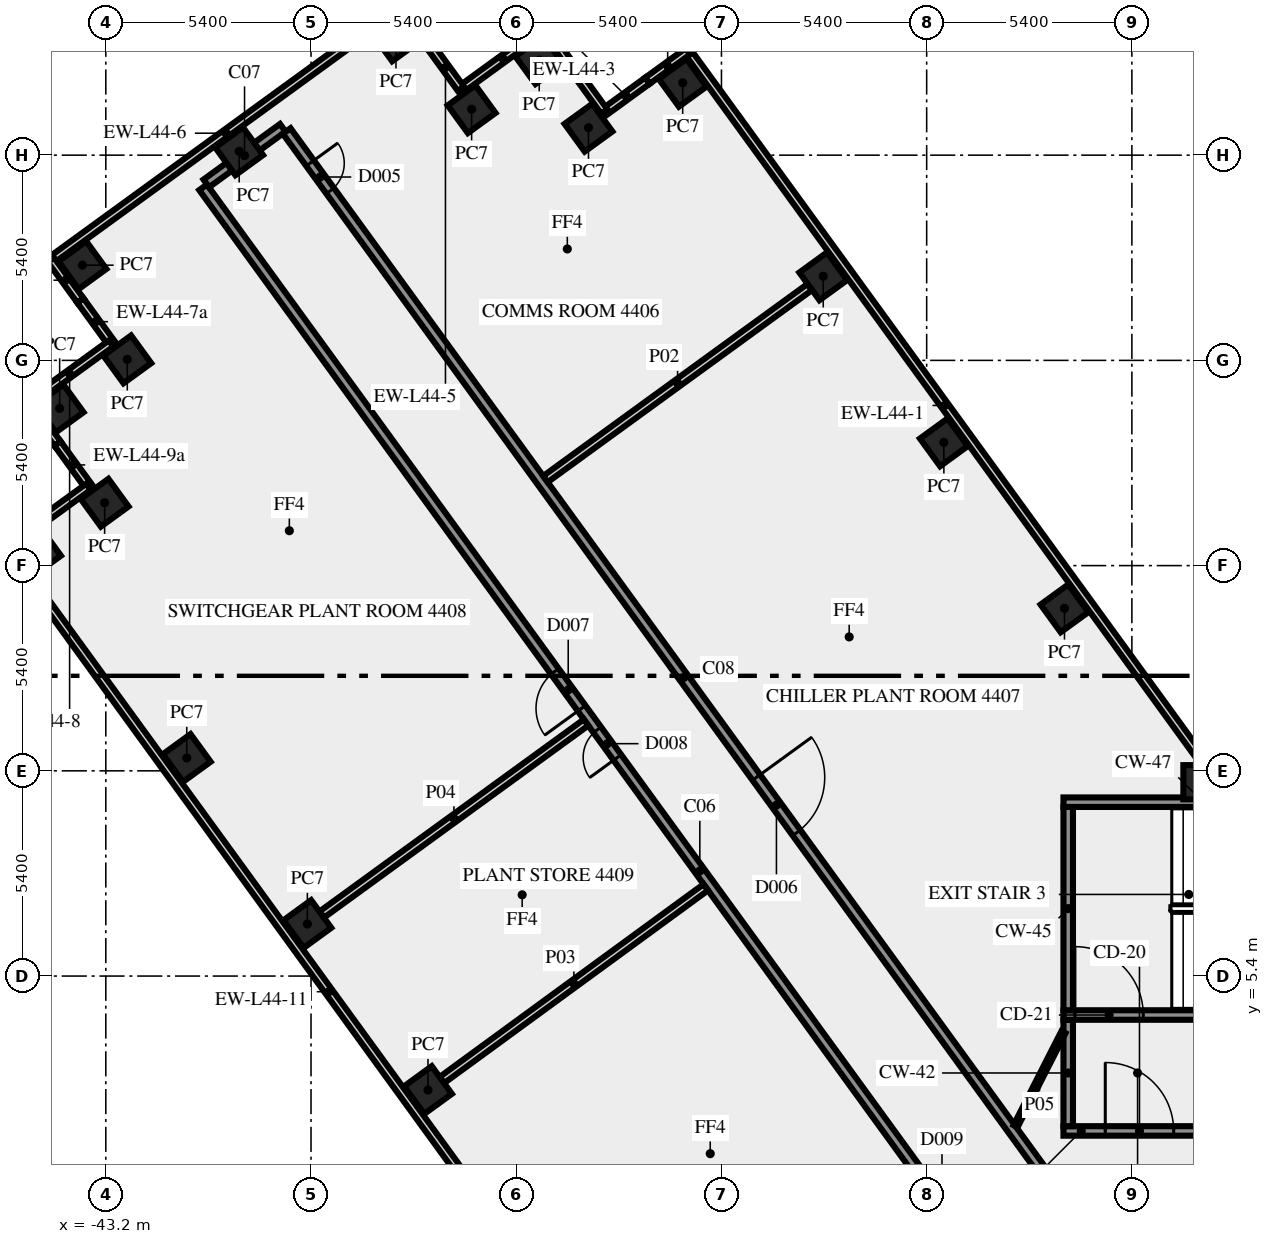
"""IFC4 building model, lengths in metres.
Left out: names, types, materials, properties, quantities, classifications, styles, units other than length and angle.
Written with IfcOpenShell. Run it as: python <this file> out.ifc"""

import sys

from ifc_helpers import new_model, si_unit, direction, frame, frame_2d, origin, origin_2d, place, context, subcontext, project, spatial, rectangle, extrude, element, fill, save


model = new_model("IFC4")
c1 = context("Model", 3, precision=1e-05, world=origin(), true_north=direction((0.0, 1.0)))
c2 = subcontext(c1, "Body", "Model", "MODEL_VIEW")
j1 = project(units=[si_unit("LENGTHUNIT", "METRE"), si_unit("PLANEANGLEUNIT", "RADIAN")], contexts=[c1])
p1 = place(None, origin())
s1 = spatial("IfcSite", under=j1, at=p1, CompositionType="ELEMENT")
p2 = place(p1, origin())
s2 = spatial("IfcBuilding", under=s1, at=p2, CompositionType="ELEMENT")
p3 = place(p2, frame((0.0, 0.0, 188.0)))
s3 = spatial("IfcBuildingStorey", under=s2, at=p3, CompositionType="ELEMENT", Elevation=188.0)
for number, where, z_axis, x_axis in (
    (1, (-17.974, 15.075, 0.0), (0.0, 0.0, 1.0), (-0.588, 0.809, 0.0)),
    (2, (-21.147, 19.444, 0.0), (0.0, 0.0, 1.0), (-0.588, 0.809, 0.0)),
    (3, (-24.321, 23.812, 0.0), (0.0, 0.0, 1.0), (-0.588, 0.809, 0.0)),
    (4, (-28.02, 28.905, 0.0), (0.0, 0.0, 1.0), (-0.809, -0.588, 0.0)),
    (5, (-30.499, 27.723, 0.0), (0.0, 0.0, 1.0), (-0.809, -0.588, 0.0)),
    (6, (-31.795, 29.5, 0.0), (0.0, 0.0, 1.0), (-0.588, 0.809, 0.0)),
    (7, (-33.574, 28.209, 0.0), (0.0, 0.0, 1.0), (-0.588, 0.809, 0.0)),
    (8, (-35.565, 30.1, 0.0), (0.0, 0.0, 1.0), (-0.809, -0.588, 0.0)),
    (9, (-39.691, 27.102, 0.0), (0.0, 0.0, 1.0), (-0.809, -0.588, 0.0)),
    (10, (-43.815, 24.105, 0.0), (0.0, 0.0, 1.0), (-0.809, -0.588, 0.0)),
    (11, (-42.635, 21.626, 0.0), (0.0, 0.0, 1.0), (-0.809, -0.588, 0.0)),
    (12, (-44.415, 20.335, 0.0), (0.0, 0.0, 1.0), (0.588, -0.809, 0.0)),
    (13, (-43.231, 17.854, 0.0), (0.0, 0.0, 1.0), (0.588, -0.809, 0.0)),
    (14, (-45.01, 16.56, 0.0), (0.0, 0.0, 1.0), (0.588, -0.809, 0.0)),
    (15, (-41.07, 11.137, 0.0), (0.0, 0.0, 1.0), (0.588, -0.809, 0.0)),
    (16, (-37.896, 6.769, 0.0), (0.0, 0.0, 1.0), (0.588, -0.809, 0.0)),
    (17, (-34.722, 2.4, 0.0), (0.0, 0.0, 1.0), (0.588, -0.809, 0.0)),
    (18, (-14.395, 10.5, 0.0), (0.0, 0.0, 1.0), (-1.0, 0.0, 0.0)),
):
    element("IfcColumn", number, at=place(p3, frame(where, z_axis=z_axis, x_axis=x_axis)), inside=s3, PredefinedType="COLUMN", context=c2, shape_type="SweptSolid", body=[
        extrude(rectangle(XDim=0.9, YDim=0.9, at=origin_2d()), origin(), (0.0, 0.0, 1.0), 5.65),
    ])
p4 = place(p3, frame((-14.354, 11.093, 0.0), z_axis=(0.0, 0.0, 1.0), x_axis=(-0.587790518608, 0.809013168147, 0.0)))
e19 = element("IfcWall", 19, at=p4, inside=s3, PredefinedType="SOLIDWALL", context=c2, shape_type="SweptSolid", body=[
    extrude(rectangle(XDim=23.044, YDim=0.2, at=frame_2d((11.522, 0.0))), origin(), (0.0, 0.0, 1.0), 5.65),
])
p5 = place(p3, frame((-27.882, 29.733, 0.0), z_axis=(0.0, 0.0, 1.0), x_axis=(-0.809064357795, -0.587720056613, 0.0)))
e20 = element("IfcWall", 20, at=p5, inside=s3, PredefinedType="SOLIDWALL", context=c2, shape_type="SweptSolid", body=[
    extrude(rectangle(XDim=1.318, YDim=0.2, at=frame_2d((0.659, 0.0))), origin(), (0.0, 0.0, 1.0), 5.65),
])
p6 = place(p3, frame((-28.949, 28.959, 0.0), z_axis=(0.0, 0.0, 1.0), x_axis=(-0.809003403559, -0.587803957991, 0.0)))
e21 = element("IfcWall", 21, at=p6, inside=s3, PredefinedType="SOLIDWALL", context=c2, shape_type="SweptSolid", body=[
    extrude(rectangle(XDim=1.382, YDim=0.2, at=frame_2d((0.691, 0.0))), origin(), (0.0, 0.0, 1.0), 4.15),
])
for number, where, z_axis, x_axis in (
    (22, (-30.083, 28.149, 0.0), (0.0, 0.0, 1.0), (-0.588, 0.809, 0.0)),
    (23, (-31.654, 30.331, 0.0), (0.0, 0.0, 1.0), (-0.809, -0.588, 0.0)),
):
    element("IfcWall", number, at=place(p3, frame(where, z_axis=z_axis, x_axis=x_axis)), inside=s3, PredefinedType="SOLIDWALL", context=c2, shape_type="SweptSolid", body=[
        extrude(rectangle(XDim=2.7, YDim=0.2, at=frame_2d((1.35, 0.0))), origin(), (0.0, 0.0, 1.0), 5.65),
    ])
p7 = place(p3, frame((-33.855, 28.746, 0.0), z_axis=(0.0, 0.0, 1.0), x_axis=(-0.587847138415, 0.808972027858, 0.0)))
e24 = element("IfcWall", 24, at=p7, inside=s3, PredefinedType="SOLIDWALL", context=c2, shape_type="SweptSolid", body=[
    extrude(rectangle(XDim=1.387, YDim=0.2, at=frame_2d((0.693, 0.0))), origin(), (0.0, 0.0, 1.0), 4.15),
])
p8 = place(p3, frame((-35.425, 30.928, 0.0), z_axis=(0.0, 0.0, 1.0), x_axis=(-0.809005491952, -0.587801083694, 0.0)))
e25 = element("IfcWall", 25, at=p8, inside=s3, PredefinedType="SOLIDWALL", context=c2, shape_type="SweptSolid", body=[
    extrude(rectangle(XDim=11.4, YDim=0.2, at=frame_2d((5.7, 0.0))), origin(), (0.0, 0.0, 1.0), 5.65),
])
p9 = place(p3, frame((-44.645, 24.244, 0.0), z_axis=(0.0, 0.0, 1.0), x_axis=(0.587797718958, -0.809007936665, 0.0)))
e26 = element("IfcWall", 26, at=p9, inside=s3, PredefinedType="SOLIDWALL", context=c2, shape_type="SweptSolid", body=[
    extrude(rectangle(XDim=1.32, YDim=0.2, at=frame_2d((0.66, 0.0))), origin(), (0.0, 0.0, 1.0), 5.65),
])
p10 = place(p3, frame((-43.869, 23.176, 0.0), z_axis=(0.0, 0.0, 1.0), x_axis=(0.587845576324, -0.808973162964, 0.0)))
e27 = element("IfcWall", 27, at=p10, inside=s3, PredefinedType="SOLIDWALL", context=c2, shape_type="SweptSolid", body=[
    extrude(rectangle(XDim=1.38, YDim=0.2, at=frame_2d((0.69, 0.0))), origin(), (0.0, 0.0, 1.0), 4.15),
])
p11 = place(p3, frame((-43.061, 22.043, 0.0), z_axis=(0.0, 0.0, 1.0), x_axis=(-0.809033161865, -0.587762999008, 0.0)))
e28 = element("IfcWall", 28, at=p11, inside=s3, PredefinedType="SOLIDWALL", context=c2, shape_type="SweptSolid", body=[
    extrude(rectangle(XDim=2.7, YDim=0.2, at=frame_2d((1.35, 0.0))), origin(), (0.0, 0.0, 1.0), 5.65),
])
p12 = place(p3, frame((-45.242, 20.473, 0.0), z_axis=(0.0, 0.0, 1.0), x_axis=(0.587652369972, -0.809113522361, 0.0)))
e29 = element("IfcWall", 29, at=p12, inside=s3, PredefinedType="SOLIDWALL", context=c2, shape_type="SweptSolid", body=[
    extrude(rectangle(XDim=1.314, YDim=0.2, at=frame_2d((0.657, 0.0))), origin(), (0.0, 0.0, 1.0), 5.65),
])
p13 = place(p3, frame((-44.47, 19.41, 0.0), z_axis=(0.0, 0.0, 1.0), x_axis=(0.58786788786, -0.808956949672, 0.0)))
e30 = element("IfcWall", 30, at=p13, inside=s3, PredefinedType="SOLIDWALL", context=c2, shape_type="SweptSolid", body=[
    extrude(rectangle(XDim=1.386, YDim=0.2, at=frame_2d((0.693, 0.0))), origin(), (0.0, 0.0, 1.0), 4.15),
])
p14 = place(p3, frame((-43.658, 18.272, 0.0), z_axis=(0.0, 0.0, 1.0), x_axis=(-0.808958916286, -0.58786518162, 0.0)))
e31 = element("IfcWall", 31, at=p14, inside=s3, PredefinedType="SOLIDWALL", context=c2, shape_type="SweptSolid", body=[
    extrude(rectangle(XDim=2.7, YDim=0.2, at=frame_2d((1.35, 0.0))), origin(), (0.0, 0.0, 1.0), 5.65),
])
p15 = place(p3, frame((-45.84, 16.701, 0.0), z_axis=(0.0, 0.0, 1.0), x_axis=(0.587788110303, -0.809014917901, 0.0)))
e32 = element("IfcWall", 32, at=p15, inside=s3, PredefinedType="SOLIDWALL", context=c2, shape_type="SweptSolid", body=[
    extrude(rectangle(XDim=28.956, YDim=0.2, at=frame_2d((14.478, 0.0))), origin(), (0.0, 0.0, 1.0), 5.65),
])
p16 = place(p3, frame((-18.0, 1.325, 0.0), z_axis=(0.0, 0.0, 1.0), x_axis=(1.0, 0.0, 0.0)))
e33 = element("IfcWall", 33, at=p16, inside=s3, PredefinedType="SHEAR", context=c2, shape_type="SweptSolid", body=[
    extrude(rectangle(XDim=3.9, YDim=0.25, at=frame_2d((1.95, 0.0))), origin(), (0.0, 0.0, 1.0), 5.65),
])
p17 = place(p16, frame((1.1, 0.0, 0.0)))
e34 = element("IfcOpeningElement", 34, at=p17, cuts=e33, PredefinedType="OPENING", context=c2, shape_type="SweptSolid", body=[
    extrude(rectangle(XDim=1.8, YDim=2.1, at=frame_2d((0.9, 1.05))), frame((0.0, 0.135, 0.0), z_axis=(0.0, -1.0, 0.0), x_axis=(1.0, 0.0, 0.0)), (0.0, 0.0, 1.0), 0.27),
])
p18 = place(p3, frame((-17.875, 1.45, 0.0), z_axis=(0.0, 0.0, 1.0), x_axis=(0.0, 1.0, 0.0)))
e35 = element("IfcWall", 35, at=p18, inside=s3, PredefinedType="SHEAR", context=c2, shape_type="SweptSolid", body=[
    extrude(rectangle(XDim=2.8, YDim=0.25, at=frame_2d((1.4, 0.0))), origin(), (0.0, 0.0, 1.0), 5.65),
])
p19 = place(p3, frame((-18.0, 4.375, 0.0), z_axis=(0.0, 0.0, 1.0), x_axis=(1.0, 0.0, 0.0)))
e36 = element("IfcWall", 36, at=p19, inside=s3, PredefinedType="SHEAR", context=c2, shape_type="SweptSolid", body=[
    extrude(rectangle(XDim=10.5, YDim=0.25, at=frame_2d((5.25, 0.0))), origin(), (0.0, 0.0, 1.0), 5.65),
])
p20 = place(p19, frame((0.3, 0.0, 0.0)))
e37 = element("IfcOpeningElement", 37, at=p20, cuts=e36, PredefinedType="OPENING", context=c2, shape_type="SweptSolid", body=[
    extrude(rectangle(XDim=1.8, YDim=2.1, at=frame_2d((0.9, 1.05))), frame((0.0, 0.135, 0.0), z_axis=(0.0, -1.0, 0.0), x_axis=(1.0, 0.0, 0.0)), (0.0, 0.0, 1.0), 0.27),
])
p21 = place(p3, frame((-17.875, 4.5, 0.0), z_axis=(0.0, 0.0, 1.0), x_axis=(0.0, 1.0, 0.0)))
e38 = element("IfcWall", 38, at=p21, inside=s3, PredefinedType="SHEAR", context=c2, shape_type="SweptSolid", body=[
    extrude(rectangle(XDim=5.35, YDim=0.25, at=frame_2d((2.675, 0.0))), origin(), (0.0, 0.0, 1.0), 5.65),
])
p22 = place(p3, frame((-18.0, 9.975, 0.0), z_axis=(0.0, 0.0, 1.0), x_axis=(1.0, 0.0, 0.0)))
e39 = element("IfcWall", 39, at=p22, inside=s3, PredefinedType="SHEAR", context=c2, shape_type="SweptSolid", body=[
    extrude(rectangle(XDim=10.5, YDim=0.25, at=frame_2d((5.25, 0.0))), origin(), (0.0, 0.0, 1.0), 5.65),
])
p23 = place(p22, frame((4.5, 0.0, 1.0)))
e40 = element("IfcOpeningElement", 40, at=p23, cuts=e39, PredefinedType="OPENING", context=c2, shape_type="SweptSolid", body=[
    extrude(rectangle(XDim=1.2, YDim=1.2, at=frame_2d((0.6, 0.6))), frame((0.0, 0.135, 0.0), z_axis=(0.0, -1.0, 0.0), x_axis=(1.0, 0.0, 0.0)), (0.0, 0.0, 1.0), 0.27),
])
p24 = place(p3, frame((-20.531, -1.523, 0.0), z_axis=(0.0, 0.0, 1.0), x_axis=(-0.587786778139, 0.80901588578, 0.0)))
e41 = element("IfcWall", 41, at=p24, inside=s3, PredefinedType="SOLIDWALL", context=c2, shape_type="SweptSolid", body=[
    extrude(rectangle(XDim=34.212, YDim=0.25, at=frame_2d((17.106, 0.0))), origin(), (0.0, 0.0, 1.0), 5.65),
])
p25 = place(p24, frame((15.666, 0.0, 0.0)))
e42 = element("IfcOpeningElement", 42, at=p25, cuts=e41, PredefinedType="OPENING", context=c2, shape_type="SweptSolid", body=[
    extrude(rectangle(XDim=0.9, YDim=2.1, at=frame_2d((0.45, 1.05))), frame((0.0, 0.135, 0.0), z_axis=(0.0, -1.0, 0.0), x_axis=(1.0, 0.0, 0.0)), (0.0, 0.0, 1.0), 0.27),
])
p26 = place(p24, frame((0.533, 0.0, 0.0)))
e43 = element("IfcOpeningElement", 43, at=p26, cuts=e41, PredefinedType="OPENING", context=c2, shape_type="SweptSolid", body=[
    extrude(rectangle(XDim=1.2, YDim=2.1, at=frame_2d((0.6, 1.05))), frame((0.0, 0.135, 0.0), z_axis=(0.0, -1.0, 0.0), x_axis=(1.0, 0.0, 0.0)), (0.0, 0.0, 1.0), 0.27),
])
p27 = place(p24, frame((17.266, 0.0, 0.0)))
e44 = element("IfcOpeningElement", 44, at=p27, cuts=e41, PredefinedType="OPENING", context=c2, shape_type="SweptSolid", body=[
    extrude(rectangle(XDim=1.2, YDim=2.1, at=frame_2d((0.6, 1.05))), frame((0.0, 0.135, 0.0), z_axis=(0.0, -1.0, 0.0), x_axis=(1.0, 0.0, 0.0)), (0.0, 0.0, 1.0), 0.27),
])
p28 = place(p3, frame((-40.556, 26.257, 0.0), z_axis=(0.0, 0.0, 1.0), x_axis=(0.809045768422, 0.587745646176, 0.0)))
e45 = element("IfcWall", 45, at=p28, inside=s3, PredefinedType="SOLIDWALL", context=c2, shape_type="SweptSolid", body=[
    extrude(rectangle(XDim=2.488, YDim=0.25, at=frame_2d((1.244, 0.0))), origin(), (0.0, 0.0, 1.0), 5.65),
])
p29 = place(p3, frame((-38.44, 27.635, 0.0), z_axis=(0.0, 0.0, 1.0), x_axis=(0.587787785895, -0.809015153599, 0.0)))
e46 = element("IfcWall", 46, at=p29, inside=s3, PredefinedType="SOLIDWALL", context=c2, shape_type="SweptSolid", body=[
    extrude(rectangle(XDim=35.549, YDim=0.25, at=frame_2d((17.775, 0.0))), origin(), (0.0, 0.0, 1.0), 5.65),
])
p30 = place(p29, frame((21.025, 0.0, 0.0)))
e47 = element("IfcOpeningElement", 47, at=p30, cuts=e46, PredefinedType="OPENING", context=c2, shape_type="SweptSolid", body=[
    extrude(rectangle(XDim=1.8, YDim=2.1, at=frame_2d((0.9, 1.05))), frame((0.0, 0.135, 0.0), z_axis=(0.0, -1.0, 0.0), x_axis=(1.0, 0.0, 0.0)), (0.0, 0.0, 1.0), 0.27),
])
p31 = place(p29, frame((1.046, 0.0, 0.0)))
e48 = element("IfcOpeningElement", 48, at=p31, cuts=e46, PredefinedType="OPENING", context=c2, shape_type="SweptSolid", body=[
    extrude(rectangle(XDim=0.9, YDim=2.1, at=frame_2d((0.45, 1.05))), frame((0.0, 0.135, 0.0), z_axis=(0.0, -1.0, 0.0), x_axis=(1.0, 0.0, 0.0)), (0.0, 0.0, 1.0), 0.27),
])
p32 = place(p3, frame((-24.677, 23.529, 0.0), z_axis=(0.0, 0.0, 1.0), x_axis=(-0.809022184937, -0.58777810803, 0.0)))
e49 = element("IfcWall", 49, at=p32, inside=s3, PredefinedType="SOLIDWALL", context=c2, shape_type="SweptSolid", body=[
    extrude(rectangle(XDim=8.595, YDim=0.2, at=frame_2d((4.297, 0.0))), origin(), (0.0, 0.0, 1.0), 5.65),
])
p33 = place(p3, frame((-34.354, 2.667, 0.0), z_axis=(0.0, 0.0, 1.0), x_axis=(0.807581053567, 0.589756595487, 0.0)))
e50 = element("IfcWall", 50, at=p33, inside=s3, PredefinedType="SOLIDWALL", context=c2, shape_type="SweptSolid", body=[
    extrude(rectangle(XDim=8.594, YDim=0.2, at=frame_2d((4.297, 0.0))), origin(), (0.0, 0.0, 1.0), 5.65),
])
p34 = place(p3, frame((-30.563, 12.072, 0.0), z_axis=(0.0, 0.0, 1.0), x_axis=(-0.808979233367, -0.58783722235, 0.0)))
e51 = element("IfcWall", 51, at=p34, inside=s3, PredefinedType="SOLIDWALL", context=c2, shape_type="SweptSolid", body=[
    extrude(rectangle(XDim=8.595, YDim=0.2, at=frame_2d((4.297, 0.0))), origin(), (0.0, 0.0, 1.0), 5.65),
])
p35 = place(p3, frame((-19.261, 1.45, 0.0), z_axis=(0.0, 0.0, 1.0), x_axis=(0.453950796792, 0.891026752736, 0.0)))
e52 = element("IfcWall", 52, at=p35, inside=s3, PredefinedType="PARTITIONING", context=c2, shape_type="SweptSolid", body=[
    extrude(rectangle(XDim=2.778, YDim=0.12, at=frame_2d((1.389, 0.0))), origin(), (0.0, 0.0, 1.0), 5.65),
])
p36 = place(p17, origin())
e53 = element("IfcDoor", 53, at=p36, inside=s3, OperationType="DOUBLE_DOOR_SINGLE_SWING", PredefinedType="DOOR", context=c2, shape_type="SweptSolid", body=[
    extrude(rectangle(XDim=1.8, YDim=2.1, at=frame_2d((0.9, 1.05))), frame((0.0, 0.025, 0.0), z_axis=(0.0, -1.0, 0.0), x_axis=(1.0, 0.0, 0.0)), (0.0, 0.0, 1.0), 0.05),
])
fill(e34, e53)
p37 = place(p20, origin())
e54 = element("IfcDoor", 54, at=p37, inside=s3, OperationType="DOUBLE_DOOR_SINGLE_SWING", PredefinedType="DOOR", context=c2, shape_type="SweptSolid", body=[
    extrude(rectangle(XDim=1.8, YDim=2.1, at=frame_2d((0.9, 1.05))), frame((0.0, 0.025, 0.0), z_axis=(0.0, -1.0, 0.0), x_axis=(1.0, 0.0, 0.0)), (0.0, 0.0, 1.0), 0.05),
])
fill(e37, e54)
p38 = place(p30, origin())
e55 = element("IfcDoor", 55, at=p38, inside=s3, OperationType="DOUBLE_DOOR_SINGLE_SWING", PredefinedType="DOOR", context=c2, shape_type="SweptSolid", body=[
    extrude(rectangle(XDim=1.8, YDim=2.1, at=frame_2d((0.9, 1.05))), frame((0.0, 0.025, 0.0), z_axis=(0.0, -1.0, 0.0), x_axis=(1.0, 0.0, 0.0)), (0.0, 0.0, 1.0), 0.05),
])
fill(e47, e55)
p39 = place(p31, origin())
e56 = element("IfcDoor", 56, at=p39, inside=s3, OperationType="SINGLE_SWING_LEFT", PredefinedType="DOOR", context=c2, shape_type="SweptSolid", body=[
    extrude(rectangle(XDim=0.9, YDim=2.1, at=frame_2d((0.45, 1.05))), frame((0.0, 0.025, 0.0), z_axis=(0.0, -1.0, 0.0), x_axis=(1.0, 0.0, 0.0)), (0.0, 0.0, 1.0), 0.05),
])
fill(e48, e56)
p40 = place(p25, origin())
e57 = element("IfcDoor", 57, at=p40, inside=s3, OperationType="SINGLE_SWING_RIGHT", PredefinedType="DOOR", context=c2, shape_type="SweptSolid", body=[
    extrude(rectangle(XDim=0.9, YDim=2.1, at=frame_2d((0.45, 1.05))), frame((0.0, 0.025, 0.0), z_axis=(0.0, -1.0, 0.0), x_axis=(1.0, 0.0, 0.0)), (0.0, 0.0, 1.0), 0.05),
])
fill(e42, e57)
p41 = place(p27, origin())
e58 = element("IfcDoor", 58, at=p41, inside=s3, OperationType="SINGLE_SWING_LEFT", PredefinedType="DOOR", context=c2, shape_type="SweptSolid", body=[
    extrude(rectangle(XDim=1.2, YDim=2.1, at=frame_2d((0.6, 1.05))), frame((0.0, 0.025, 0.0), z_axis=(0.0, -1.0, 0.0), x_axis=(1.0, 0.0, 0.0)), (0.0, 0.0, 1.0), 0.05),
])
fill(e44, e58)
save(model, sys.argv[1])
